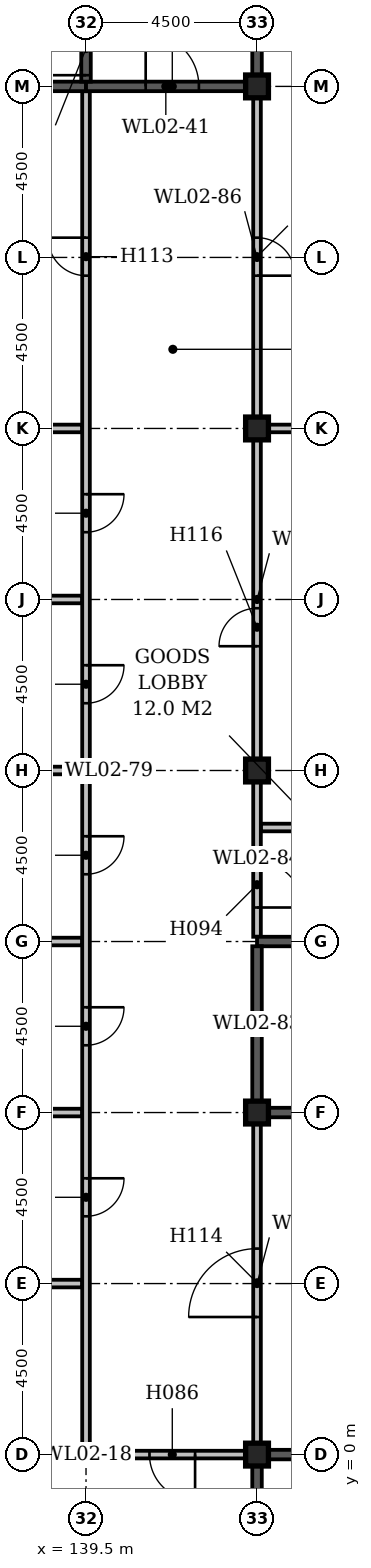
"""IFC4 building model, lengths in metres.
Left out: names, types, materials, properties, quantities, classifications, styles, units other than length and angle.
Written with IfcOpenShell. Run it as: python <this file> out.ifc"""

import sys

from ifc_helpers import new_model, si_unit, direction, frame, frame_2d, origin, origin_2d, place, context, subcontext, project, spatial, rectangle, extrude, element, fill, save


model = new_model("IFC4")
c1 = context("Model", 3, precision=1e-05, world=origin(), true_north=direction((0.0, 1.0)))
c2 = subcontext(c1, "Body", "Model", "MODEL_VIEW")
j1 = project(units=[si_unit("LENGTHUNIT", "METRE"), si_unit("PLANEANGLEUNIT", "RADIAN")], contexts=[c1])
p1 = place(None, origin())
s1 = spatial("IfcSite", under=j1, at=p1, CompositionType="ELEMENT")
p2 = place(p1, origin())
s2 = spatial("IfcBuilding", under=s1, at=p2, CompositionType="ELEMENT")
p3 = place(p2, frame((0.0, 0.0, 14.0)))
s3 = spatial("IfcBuildingStorey", under=s2, at=p3, CompositionType="ELEMENT", Elevation=14.0)
for number, where, z_axis, x_axis in (
    (1, (144.0, 0.0, 0.0), (0.0, 0.0, 1.0), (1.0, 0.0, 0.0)),
    (2, (144.0, 9.0, 0.0), (0.0, 0.0, 1.0), (1.0, 0.0, 0.0)),
    (3, (144.0, 18.0, 0.0), (0.0, 0.0, 1.0), (1.0, 0.0, 0.0)),
    (4, (144.0, 27.0, 0.0), (0.0, 0.0, 1.0), (1.0, 0.0, 0.0)),
    (5, (144.0, 36.0, 0.0), (0.0, 0.0, 1.0), (1.0, 0.0, 0.0)),
):
    element("IfcColumn", number, at=place(p3, frame(where, z_axis=z_axis, x_axis=x_axis)), inside=s3, PredefinedType="COLUMN", context=c2, shape_type="SweptSolid", body=[
        extrude(rectangle(XDim=0.6, YDim=0.6, at=origin_2d()), origin(), (0.0, 0.0, 1.0), 4.7),
    ])
p4 = place(p3, frame((135.4, 0.0, 0.0), z_axis=(0.0, 0.0, 1.0), x_axis=(1.0, 0.0, 0.0)))
e6 = element("IfcWall", 6, at=p4, inside=s3, PredefinedType="STANDARD", context=c2, shape_type="SweptSolid", body=[
    extrude(rectangle(XDim=8.3, YDim=0.2, at=frame_2d((4.15, 0.0))), origin(), (0.0, 0.0, 1.0), 4.7),
])
p5 = place(p4, frame((5.77, 0.0, 0.0)))
e7 = element("IfcOpeningElement", 7, at=p5, cuts=e6, PredefinedType="OPENING", context=c2, shape_type="SweptSolid", body=[
    extrude(rectangle(XDim=1.2, YDim=2.1, at=frame_2d((0.6, 1.05))), frame((0.0, 0.112, 0.0), z_axis=(0.0, -1.0, 0.0), x_axis=(1.0, 0.0, 0.0)), (0.0, 0.0, 1.0), 0.224),
])
p6 = place(p4, frame((1.37, 0.0, 0.0)))
e8 = element("IfcOpeningElement", 8, at=p6, cuts=e6, PredefinedType="OPENING", context=c2, shape_type="SweptSolid", body=[
    extrude(rectangle(XDim=1.0, YDim=2.1, at=frame_2d((0.5, 1.05))), frame((0.0, 0.112, 0.0), z_axis=(0.0, -1.0, 0.0), x_axis=(1.0, 0.0, 0.0)), (0.0, 0.0, 1.0), 0.224),
])
p7 = place(p3, frame((144.3, 0.0, 0.0), z_axis=(0.0, 0.0, 1.0), x_axis=(1.0, 0.0, 0.0)))
e9 = element("IfcWall", 9, at=p7, inside=s3, PredefinedType="STANDARD", context=c2, shape_type="SweptSolid", body=[
    extrude(rectangle(XDim=4.2, YDim=0.25, at=frame_2d((2.1, 0.0))), origin(), (0.0, 0.0, 1.0), 5.0),
])
p8 = place(p3, frame((135.25, 4.5, 0.0), z_axis=(0.0, 0.0, 1.0), x_axis=(1.0, 0.0, 0.0)))
e10 = element("IfcWall", 10, at=p8, inside=s3, PredefinedType="STANDARD", context=c2, shape_type="SweptSolid", body=[
    extrude(rectangle(XDim=4.15, YDim=0.2, at=frame_2d((2.075, 0.0))), origin(), (0.0, 0.0, 1.0), 4.7),
])
p9 = place(p3, frame((135.4, 9.0, 0.0), z_axis=(0.0, 0.0, 1.0), x_axis=(1.0, 0.0, 0.0)))
e11 = element("IfcWall", 11, at=p9, inside=s3, PredefinedType="STANDARD", context=c2, shape_type="SweptSolid", body=[
    extrude(rectangle(XDim=4.0, YDim=0.2, at=frame_2d((2.0, 0.0))), origin(), (0.0, 0.0, 1.0), 4.7),
])
p10 = place(p3, frame((144.3, 9.0, 0.0), z_axis=(0.0, 0.0, 1.0), x_axis=(1.0, 0.0, 0.0)))
e12 = element("IfcWall", 12, at=p10, inside=s3, PredefinedType="STANDARD", context=c2, shape_type="SweptSolid", body=[
    extrude(rectangle(XDim=4.2, YDim=0.25, at=frame_2d((2.1, 0.0))), origin(), (0.0, 0.0, 1.0), 5.0),
])
p11 = place(p3, frame((135.25, 13.5, 0.0), z_axis=(0.0, 0.0, 1.0), x_axis=(1.0, 0.0, 0.0)))
e13 = element("IfcWall", 13, at=p11, inside=s3, PredefinedType="STANDARD", context=c2, shape_type="SweptSolid", body=[
    extrude(rectangle(XDim=4.15, YDim=0.2, at=frame_2d((2.075, 0.0))), origin(), (0.0, 0.0, 1.0), 4.7),
])
p12 = place(p3, frame((144.0, 13.5, 0.0), z_axis=(0.0, 0.0, 1.0), x_axis=(1.0, 0.0, 0.0)))
e14 = element("IfcWall", 14, at=p12, inside=s3, PredefinedType="STANDARD", context=c2, shape_type="SweptSolid", body=[
    extrude(rectangle(XDim=4.5, YDim=0.25, at=frame_2d((2.25, 0.0))), origin(), (0.0, 0.0, 1.0), 5.0),
])
p13 = place(p12, frame((1.72, 0.0, 0.0)))
e15 = element("IfcOpeningElement", 15, at=p13, cuts=e14, PredefinedType="OPENING", context=c2, shape_type="SweptSolid", body=[
    extrude(rectangle(XDim=1.1, YDim=2.1, at=frame_2d((0.55, 1.05))), frame((0.0, 0.137, 0.0), z_axis=(0.0, -1.0, 0.0), x_axis=(1.0, 0.0, 0.0)), (0.0, 0.0, 1.0), 0.274),
])
p14 = place(p3, frame((144.1, 16.5, 0.0), z_axis=(0.0, 0.0, 1.0), x_axis=(1.0, 0.0, 0.0)))
e16 = element("IfcWall", 16, at=p14, inside=s3, PredefinedType="STANDARD", context=c2, shape_type="SweptSolid", body=[
    extrude(rectangle(XDim=8.725, YDim=0.2, at=frame_2d((4.362, 0.0))), origin(), (0.0, 0.0, 1.0), 4.7),
])
p15 = place(p3, frame((135.4, 18.0, 0.0), z_axis=(0.0, 0.0, 1.0), x_axis=(1.0, 0.0, 0.0)))
e17 = element("IfcWall", 17, at=p15, inside=s3, PredefinedType="STANDARD", context=c2, shape_type="SweptSolid", body=[
    extrude(rectangle(XDim=4.0, YDim=0.2, at=frame_2d((2.0, 0.0))), origin(), (0.0, 0.0, 1.0), 4.7),
])
p16 = place(p3, frame((135.25, 22.5, 0.0), z_axis=(0.0, 0.0, 1.0), x_axis=(1.0, 0.0, 0.0)))
e18 = element("IfcWall", 18, at=p16, inside=s3, PredefinedType="STANDARD", context=c2, shape_type="SweptSolid", body=[
    extrude(rectangle(XDim=4.15, YDim=0.2, at=frame_2d((2.075, 0.0))), origin(), (0.0, 0.0, 1.0), 4.7),
])
p17 = place(p3, frame((135.4, 27.0, 0.0), z_axis=(0.0, 0.0, 1.0), x_axis=(1.0, 0.0, 0.0)))
e19 = element("IfcWall", 19, at=p17, inside=s3, PredefinedType="STANDARD", context=c2, shape_type="SweptSolid", body=[
    extrude(rectangle(XDim=4.0, YDim=0.2, at=frame_2d((2.0, 0.0))), origin(), (0.0, 0.0, 1.0), 4.7),
])
p18 = place(p3, frame((144.3, 27.0, 0.0), z_axis=(0.0, 0.0, 1.0), x_axis=(1.0, 0.0, 0.0)))
e20 = element("IfcWall", 20, at=p18, inside=s3, PredefinedType="STANDARD", context=c2, shape_type="SweptSolid", body=[
    extrude(rectangle(XDim=8.4, YDim=0.2, at=frame_2d((4.2, 0.0))), origin(), (0.0, 0.0, 1.0), 4.7),
])
p19 = place(p3, frame((135.3, 36.0, 0.0), z_axis=(0.0, 0.0, 1.0), x_axis=(1.0, 0.0, 0.0)))
e21 = element("IfcWall", 21, at=p19, inside=s3, PredefinedType="STANDARD", context=c2, shape_type="SweptSolid", body=[
    extrude(rectangle(XDim=4.2, YDim=0.25, at=frame_2d((2.1, 0.0))), origin(), (0.0, 0.0, 1.0), 5.0),
])
p20 = place(p3, frame((139.5, 36.0, 0.0), z_axis=(0.0, 0.0, 1.0), x_axis=(1.0, 0.0, 0.0)))
e22 = element("IfcWall", 22, at=p20, inside=s3, PredefinedType="STANDARD", context=c2, shape_type="SweptSolid", body=[
    extrude(rectangle(XDim=4.2, YDim=0.25, at=frame_2d((2.1, 0.0))), origin(), (0.0, 0.0, 1.0), 4.7),
])
p21 = place(p20, frame((1.57, 0.0, 0.0)))
e23 = element("IfcOpeningElement", 23, at=p21, cuts=e22, PredefinedType="OPENING", context=c2, shape_type="SweptSolid", body=[
    extrude(rectangle(XDim=1.4, YDim=2.1, at=frame_2d((0.7, 1.05))), frame((0.0, 0.137, 0.0), z_axis=(0.0, -1.0, 0.0), x_axis=(1.0, 0.0, 0.0)), (0.0, 0.0, 1.0), 0.274),
])
p22 = place(p3, frame((139.5, 0.1, 0.0), z_axis=(0.0, 0.0, 1.0), x_axis=(0.0, 1.0, 0.0)))
e24 = element("IfcWall", 24, at=p22, inside=s3, PredefinedType="STANDARD", context=c2, shape_type="SweptSolid", body=[
    extrude(rectangle(XDim=35.775, YDim=0.2, at=frame_2d((17.887, 0.0))), origin(), (0.0, 0.0, 1.0), 4.7),
])
p23 = place(p22, frame((6.17, 0.0, 0.0)))
e25 = element("IfcOpeningElement", 25, at=p23, cuts=e24, PredefinedType="OPENING", context=c2, shape_type="SweptSolid", body=[
    extrude(rectangle(XDim=1.0, YDim=2.1, at=frame_2d((0.5, 1.05))), frame((0.0, 0.112, 0.0), z_axis=(0.0, -1.0, 0.0), x_axis=(1.0, 0.0, 0.0)), (0.0, 0.0, 1.0), 0.224),
])
p24 = place(p22, frame((10.67, 0.0, 0.0)))
e26 = element("IfcOpeningElement", 26, at=p24, cuts=e24, PredefinedType="OPENING", context=c2, shape_type="SweptSolid", body=[
    extrude(rectangle(XDim=1.0, YDim=2.1, at=frame_2d((0.5, 1.05))), frame((0.0, 0.112, 0.0), z_axis=(0.0, -1.0, 0.0), x_axis=(1.0, 0.0, 0.0)), (0.0, 0.0, 1.0), 0.224),
])
p25 = place(p22, frame((15.17, 0.0, 0.0)))
e27 = element("IfcOpeningElement", 27, at=p25, cuts=e24, PredefinedType="OPENING", context=c2, shape_type="SweptSolid", body=[
    extrude(rectangle(XDim=1.0, YDim=2.1, at=frame_2d((0.5, 1.05))), frame((0.0, 0.112, 0.0), z_axis=(0.0, -1.0, 0.0), x_axis=(1.0, 0.0, 0.0)), (0.0, 0.0, 1.0), 0.224),
])
p26 = place(p22, frame((19.67, 0.0, 0.0)))
e28 = element("IfcOpeningElement", 28, at=p26, cuts=e24, PredefinedType="OPENING", context=c2, shape_type="SweptSolid", body=[
    extrude(rectangle(XDim=1.0, YDim=2.1, at=frame_2d((0.5, 1.05))), frame((0.0, 0.112, 0.0), z_axis=(0.0, -1.0, 0.0), x_axis=(1.0, 0.0, 0.0)), (0.0, 0.0, 1.0), 0.224),
])
p27 = place(p22, frame((24.17, 0.0, 0.0)))
e29 = element("IfcOpeningElement", 29, at=p27, cuts=e24, PredefinedType="OPENING", context=c2, shape_type="SweptSolid", body=[
    extrude(rectangle(XDim=1.0, YDim=2.1, at=frame_2d((0.5, 1.05))), frame((0.0, 0.112, 0.0), z_axis=(0.0, -1.0, 0.0), x_axis=(1.0, 0.0, 0.0)), (0.0, 0.0, 1.0), 0.224),
])
p28 = place(p22, frame((30.92, 0.0, 0.0)))
e30 = element("IfcOpeningElement", 30, at=p28, cuts=e24, PredefinedType="OPENING", context=c2, shape_type="SweptSolid", body=[
    extrude(rectangle(XDim=1.0, YDim=2.1, at=frame_2d((0.5, 1.05))), frame((0.0, 0.112, 0.0), z_axis=(0.0, -1.0, 0.0), x_axis=(1.0, 0.0, 0.0)), (0.0, 0.0, 1.0), 0.224),
])
p29 = place(p3, frame((139.5, 36.125, 0.0), z_axis=(0.0, 0.0, 1.0), x_axis=(0.0, 1.0, 0.0)))
e31 = element("IfcWall", 31, at=p29, inside=s3, PredefinedType="STANDARD", context=c2, shape_type="SweptSolid", body=[
    extrude(rectangle(XDim=8.7, YDim=0.25, at=frame_2d((4.35, 0.0))), origin(), (0.0, 0.0, 1.0), 5.0),
])
p30 = place(p29, frame((0.17, 0.0, 0.0)))
e32 = element("IfcOpeningElement", 32, at=p30, cuts=e31, PredefinedType="OPENING", context=c2, shape_type="SweptSolid", body=[
    extrude(rectangle(XDim=1.4, YDim=2.1, at=frame_2d((0.7, 1.05))), frame((0.0, 0.137, 0.0), z_axis=(0.0, -1.0, 0.0), x_axis=(1.0, 0.0, 0.0)), (0.0, 0.0, 1.0), 0.274),
])
p31 = place(p3, frame((144.0, -8.7, 0.0), z_axis=(0.0, 0.0, 1.0), x_axis=(0.0, 1.0, 0.0)))
e33 = element("IfcWall", 33, at=p31, inside=s3, PredefinedType="STANDARD", context=c2, shape_type="SweptSolid", body=[
    extrude(rectangle(XDim=8.4, YDim=0.25, at=frame_2d((4.2, 0.0))), origin(), (0.0, 0.0, 1.0), 5.0),
])
p32 = place(p31, frame((0.12, 0.0, 0.0)))
e34 = element("IfcOpeningElement", 34, at=p32, cuts=e33, PredefinedType="OPENING", context=c2, shape_type="SweptSolid", body=[
    extrude(rectangle(XDim=1.2, YDim=2.1, at=frame_2d((0.6, 1.05))), frame((0.0, 0.137, 0.0), z_axis=(0.0, -1.0, 0.0), x_axis=(1.0, 0.0, 0.0)), (0.0, 0.0, 1.0), 0.274),
])
p33 = place(p3, frame((144.0, 0.3, 0.0), z_axis=(0.0, 0.0, 1.0), x_axis=(0.0, 1.0, 0.0)))
e35 = element("IfcWall", 35, at=p33, inside=s3, PredefinedType="STANDARD", context=c2, shape_type="SweptSolid", body=[
    extrude(rectangle(XDim=8.4, YDim=0.2, at=frame_2d((4.2, 0.0))), origin(), (0.0, 0.0, 1.0), 4.7),
])
p34 = place(p33, frame((3.32, 0.0, 0.0)))
e36 = element("IfcOpeningElement", 36, at=p34, cuts=e35, PredefinedType="OPENING", context=c2, shape_type="SweptSolid", body=[
    extrude(rectangle(XDim=1.8, YDim=2.4, at=frame_2d((0.9, 1.2))), frame((0.0, 0.112, 0.0), z_axis=(0.0, -1.0, 0.0), x_axis=(1.0, 0.0, 0.0)), (0.0, 0.0, 1.0), 0.224),
])
p35 = place(p3, frame((144.0, 9.3, 0.0), z_axis=(0.0, 0.0, 1.0), x_axis=(0.0, 1.0, 0.0)))
e37 = element("IfcWall", 37, at=p35, inside=s3, PredefinedType="STANDARD", context=c2, shape_type="SweptSolid", body=[
    extrude(rectangle(XDim=4.075, YDim=0.25, at=frame_2d((2.038, 0.0))), origin(), (0.0, 0.0, 1.0), 5.0),
])
p36 = place(p3, frame((144.0, 13.625, 0.0), z_axis=(0.0, 0.0, 1.0), x_axis=(0.0, 1.0, 0.0)))
e38 = element("IfcWall", 38, at=p36, inside=s3, PredefinedType="STANDARD", context=c2, shape_type="SweptSolid", body=[
    extrude(rectangle(XDim=4.075, YDim=0.2, at=frame_2d((2.038, 0.0))), origin(), (0.0, 0.0, 1.0), 4.7),
])
p37 = place(p36, frame((0.77, 0.0, 0.0)))
e39 = element("IfcOpeningElement", 39, at=p37, cuts=e38, PredefinedType="OPENING", context=c2, shape_type="SweptSolid", body=[
    extrude(rectangle(XDim=1.2, YDim=2.1, at=frame_2d((0.6, 1.05))), frame((0.0, 0.112, 0.0), z_axis=(0.0, -1.0, 0.0), x_axis=(1.0, 0.0, 0.0)), (0.0, 0.0, 1.0), 0.224),
])
p38 = place(p3, frame((144.0, 18.3, 0.0), z_axis=(0.0, 0.0, 1.0), x_axis=(0.0, 1.0, 0.0)))
e40 = element("IfcWall", 40, at=p38, inside=s3, PredefinedType="STANDARD", context=c2, shape_type="SweptSolid", body=[
    extrude(rectangle(XDim=8.4, YDim=0.2, at=frame_2d((4.2, 0.0))), origin(), (0.0, 0.0, 1.0), 4.7),
])
p39 = place(p38, frame((2.97, 0.0, 0.0)))
e41 = element("IfcOpeningElement", 41, at=p39, cuts=e40, PredefinedType="OPENING", context=c2, shape_type="SweptSolid", body=[
    extrude(rectangle(XDim=1.0, YDim=2.1, at=frame_2d((0.5, 1.05))), frame((0.0, 0.112, 0.0), z_axis=(0.0, -1.0, 0.0), x_axis=(1.0, 0.0, 0.0)), (0.0, 0.0, 1.0), 0.224),
])
p40 = place(p3, frame((144.0, 27.3, 0.0), z_axis=(0.0, 0.0, 1.0), x_axis=(0.0, 1.0, 0.0)))
e42 = element("IfcWall", 42, at=p40, inside=s3, PredefinedType="STANDARD", context=c2, shape_type="SweptSolid", body=[
    extrude(rectangle(XDim=8.4, YDim=0.2, at=frame_2d((4.2, 0.0))), origin(), (0.0, 0.0, 1.0), 4.7),
])
p41 = place(p40, frame((3.72, 0.0, 0.0)))
e43 = element("IfcOpeningElement", 43, at=p41, cuts=e42, PredefinedType="OPENING", context=c2, shape_type="SweptSolid", body=[
    extrude(rectangle(XDim=1.0, YDim=2.1, at=frame_2d((0.5, 1.05))), frame((0.0, 0.112, 0.0), z_axis=(0.0, -1.0, 0.0), x_axis=(1.0, 0.0, 0.0)), (0.0, 0.0, 1.0), 0.224),
])
p42 = place(p3, frame((144.0, 36.3, 0.0), z_axis=(0.0, 0.0, 1.0), x_axis=(0.0, 1.0, 0.0)))
e44 = element("IfcWall", 44, at=p42, inside=s3, PredefinedType="STANDARD", context=c2, shape_type="SweptSolid", body=[
    extrude(rectangle(XDim=8.4, YDim=0.25, at=frame_2d((4.2, 0.0))), origin(), (0.0, 0.0, 1.0), 4.7),
])
p43 = place(p5, origin())
e45 = element("IfcDoor", 45, at=p43, inside=s3, OperationType="SINGLE_SWING_RIGHT", PredefinedType="DOOR", context=c2, shape_type="SweptSolid", body=[
    extrude(rectangle(XDim=1.2, YDim=2.1, at=frame_2d((0.6, 1.05))), frame((0.0, 0.025, 0.0), z_axis=(0.0, -1.0, 0.0), x_axis=(1.0, 0.0, 0.0)), (0.0, 0.0, 1.0), 0.05),
])
fill(e7, e45)
p44 = place(p30, origin())
e46 = element("IfcDoor", 46, at=p44, inside=s3, OperationType="DOUBLE_DOOR_SINGLE_SWING", PredefinedType="DOOR", context=c2, shape_type="SweptSolid", body=[
    extrude(rectangle(XDim=1.4, YDim=2.1, at=frame_2d((0.7, 1.05))), frame((0.0, 0.025, 0.0), z_axis=(0.0, -1.0, 0.0), x_axis=(1.0, 0.0, 0.0)), (0.0, 0.0, 1.0), 0.05),
])
fill(e32, e46)
p45 = place(p21, origin())
e47 = element("IfcDoor", 47, at=p45, inside=s3, OperationType="DOUBLE_DOOR_SINGLE_SWING", PredefinedType="DOOR", context=c2, shape_type="SweptSolid", body=[
    extrude(rectangle(XDim=1.4, YDim=2.1, at=frame_2d((0.7, 1.05))), frame((0.0, 0.025, 0.0), z_axis=(0.0, -1.0, 0.0), x_axis=(1.0, 0.0, 0.0)), (0.0, 0.0, 1.0), 0.05),
])
fill(e23, e47)
p46 = place(p37, frame((1.2, 0.0, 0.0), z_axis=(0.0, 0.0, 1.0), x_axis=(-1.0, 0.0, 0.0)))
e48 = element("IfcDoor", 48, at=p46, inside=s3, OperationType="SINGLE_SWING_RIGHT", PredefinedType="DOOR", context=c2, shape_type="SweptSolid", body=[
    extrude(rectangle(XDim=1.2, YDim=2.1, at=frame_2d((0.6, 1.05))), frame((0.0, 0.025, 0.0), z_axis=(0.0, -1.0, 0.0), x_axis=(1.0, 0.0, 0.0)), (0.0, 0.0, 1.0), 0.05),
])
fill(e39, e48)
p47 = place(p23, origin())
e49 = element("IfcDoor", 49, at=p47, inside=s3, OperationType="SINGLE_SWING_RIGHT", PredefinedType="DOOR", context=c2, shape_type="SweptSolid", body=[
    extrude(rectangle(XDim=1.0, YDim=2.1, at=frame_2d((0.5, 1.05))), frame((0.0, 0.025, 0.0), z_axis=(0.0, -1.0, 0.0), x_axis=(1.0, 0.0, 0.0)), (0.0, 0.0, 1.0), 0.05),
])
fill(e25, e49)
p48 = place(p24, origin())
e50 = element("IfcDoor", 50, at=p48, inside=s3, OperationType="SINGLE_SWING_RIGHT", PredefinedType="DOOR", context=c2, shape_type="SweptSolid", body=[
    extrude(rectangle(XDim=1.0, YDim=2.1, at=frame_2d((0.5, 1.05))), frame((0.0, 0.025, 0.0), z_axis=(0.0, -1.0, 0.0), x_axis=(1.0, 0.0, 0.0)), (0.0, 0.0, 1.0), 0.05),
])
fill(e26, e50)
p49 = place(p25, origin())
e51 = element("IfcDoor", 51, at=p49, inside=s3, OperationType="SINGLE_SWING_RIGHT", PredefinedType="DOOR", context=c2, shape_type="SweptSolid", body=[
    extrude(rectangle(XDim=1.0, YDim=2.1, at=frame_2d((0.5, 1.05))), frame((0.0, 0.025, 0.0), z_axis=(0.0, -1.0, 0.0), x_axis=(1.0, 0.0, 0.0)), (0.0, 0.0, 1.0), 0.05),
])
fill(e27, e51)
p50 = place(p26, origin())
e52 = element("IfcDoor", 52, at=p50, inside=s3, OperationType="SINGLE_SWING_RIGHT", PredefinedType="DOOR", context=c2, shape_type="SweptSolid", body=[
    extrude(rectangle(XDim=1.0, YDim=2.1, at=frame_2d((0.5, 1.05))), frame((0.0, 0.025, 0.0), z_axis=(0.0, -1.0, 0.0), x_axis=(1.0, 0.0, 0.0)), (0.0, 0.0, 1.0), 0.05),
])
fill(e28, e52)
p51 = place(p27, origin())
e53 = element("IfcDoor", 53, at=p51, inside=s3, OperationType="SINGLE_SWING_RIGHT", PredefinedType="DOOR", context=c2, shape_type="SweptSolid", body=[
    extrude(rectangle(XDim=1.0, YDim=2.1, at=frame_2d((0.5, 1.05))), frame((0.0, 0.025, 0.0), z_axis=(0.0, -1.0, 0.0), x_axis=(1.0, 0.0, 0.0)), (0.0, 0.0, 1.0), 0.05),
])
fill(e29, e53)
p52 = place(p28, frame((1.0, 0.0, 0.0), z_axis=(0.0, 0.0, 1.0), x_axis=(-1.0, 0.0, 0.0)))
e54 = element("IfcDoor", 54, at=p52, inside=s3, OperationType="SINGLE_SWING_LEFT", PredefinedType="DOOR", context=c2, shape_type="SweptSolid", body=[
    extrude(rectangle(XDim=1.0, YDim=2.1, at=frame_2d((0.5, 1.05))), frame((0.0, 0.025, 0.0), z_axis=(0.0, -1.0, 0.0), x_axis=(1.0, 0.0, 0.0)), (0.0, 0.0, 1.0), 0.05),
])
fill(e30, e54)
p53 = place(p34, origin())
e55 = element("IfcDoor", 55, at=p53, inside=s3, OperationType="DOUBLE_DOOR_SINGLE_SWING", PredefinedType="DOOR", context=c2, shape_type="SweptSolid", body=[
    extrude(rectangle(XDim=1.8, YDim=2.4, at=frame_2d((0.9, 1.2))), frame((0.0, 0.025, 0.0), z_axis=(0.0, -1.0, 0.0), x_axis=(1.0, 0.0, 0.0)), (0.0, 0.0, 1.0), 0.05),
])
fill(e36, e55)
p54 = place(p39, origin())
e56 = element("IfcDoor", 56, at=p54, inside=s3, OperationType="SINGLE_SWING_LEFT", PredefinedType="DOOR", context=c2, shape_type="SweptSolid", body=[
    extrude(rectangle(XDim=1.0, YDim=2.1, at=frame_2d((0.5, 1.05))), frame((0.0, 0.025, 0.0), z_axis=(0.0, -1.0, 0.0), x_axis=(1.0, 0.0, 0.0)), (0.0, 0.0, 1.0), 0.05),
])
fill(e41, e56)
p55 = place(p41, frame((1.0, 0.0, 0.0), z_axis=(0.0, 0.0, 1.0), x_axis=(-1.0, 0.0, 0.0)))
e57 = element("IfcDoor", 57, at=p55, inside=s3, OperationType="SINGLE_SWING_RIGHT", PredefinedType="DOOR", context=c2, shape_type="SweptSolid", body=[
    extrude(rectangle(XDim=1.0, YDim=2.1, at=frame_2d((0.5, 1.05))), frame((0.0, 0.025, 0.0), z_axis=(0.0, -1.0, 0.0), x_axis=(1.0, 0.0, 0.0)), (0.0, 0.0, 1.0), 0.05),
])
fill(e43, e57)
save(model, sys.argv[1])
